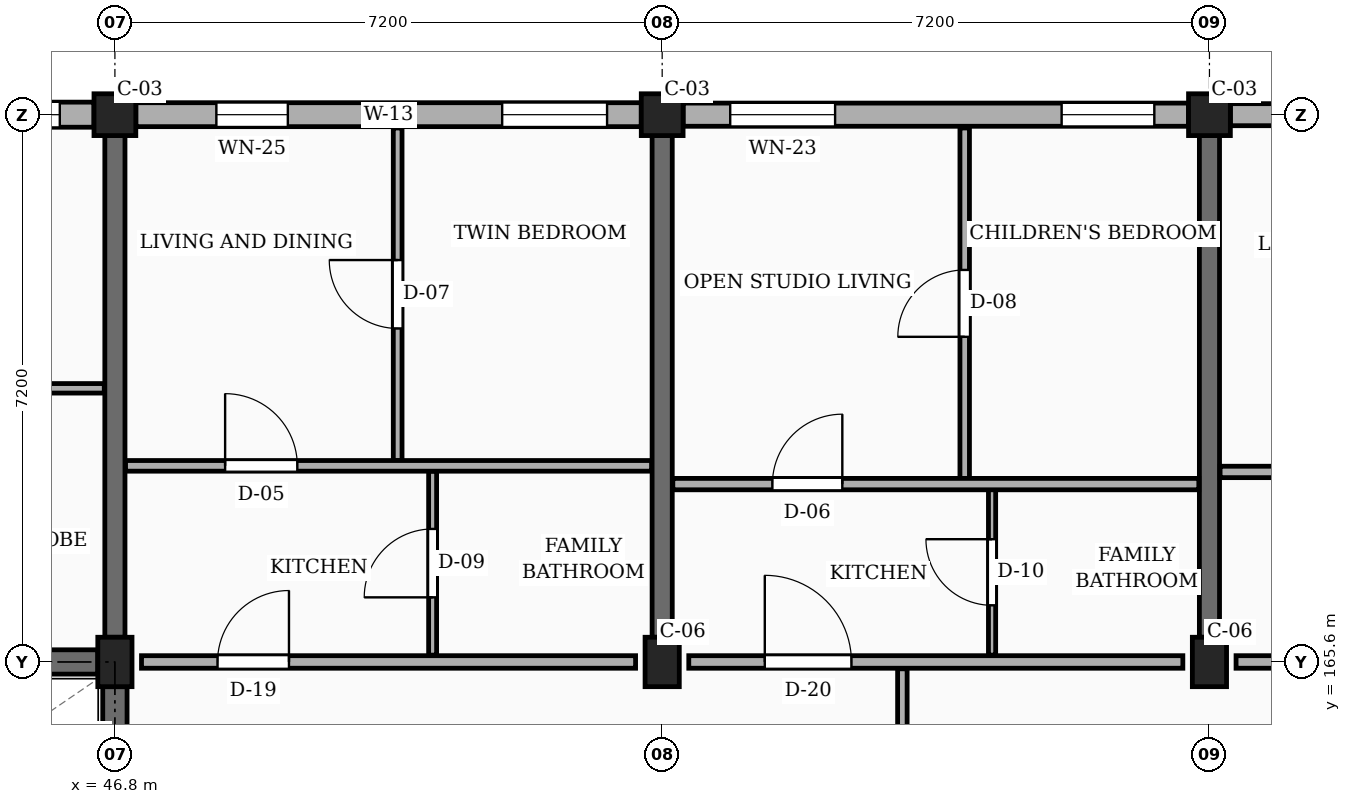
"""IFC4 building model, lengths in metres.
Left out: names, types, materials, properties, quantities, classifications, styles, units other than length and angle.
Written with IfcOpenShell. Run it as: python <this file> out.ifc"""

import sys

from ifc_helpers import new_model, si_unit, direction, frame, frame_2d, origin, origin_2d, place, context, subcontext, project, spatial, rectangle, extrude, element, fill, save


model = new_model("IFC4")
c1 = context("Model", 3, precision=1e-05, world=origin(), true_north=direction((0.0, 1.0)))
c2 = subcontext(c1, "Body", "Model", "MODEL_VIEW")
j1 = project(units=[si_unit("LENGTHUNIT", "METRE"), si_unit("PLANEANGLEUNIT", "RADIAN")], contexts=[c1])
p1 = place(None, origin())
s1 = spatial("IfcSite", under=j1, at=p1, CompositionType="ELEMENT")
p2 = place(p1, origin())
s2 = spatial("IfcBuilding", under=s1, at=p2, CompositionType="ELEMENT")
p3 = place(p2, frame((0.0, 0.0, 10.8)))
s3 = spatial("IfcBuildingStorey", under=s2, at=p3, CompositionType="ELEMENT", Elevation=10.8)
p4 = place(p3, frame((46.8, 165.6, 0.0), z_axis=(0.0, 0.0, 1.0), x_axis=(1.0, 0.0, 0.0)))
e1 = element("IfcColumn", 1, at=p4, inside=s3, PredefinedType="COLUMN", context=c2, shape_type="SweptSolid", body=[
    extrude(rectangle(XDim=0.45, YDim=0.65, at=origin_2d()), origin(), (0.0, 0.0, 1.0), 3.15),
])
p5 = place(p3, frame((46.8, 172.8, 0.0), z_axis=(0.0, 0.0, 1.0), x_axis=(1.0, 0.0, 0.0)))
e2 = element("IfcColumn", 2, at=p5, inside=s3, PredefinedType="COLUMN", context=c2, shape_type="SweptSolid", body=[
    extrude(rectangle(XDim=0.55, YDim=0.55, at=origin_2d()), origin(), (0.0, 0.0, 1.0), 3.15),
])
p6 = place(p3, frame((54.0, 165.6, 0.0), z_axis=(0.0, 0.0, 1.0), x_axis=(1.0, 0.0, 0.0)))
e3 = element("IfcColumn", 3, at=p6, inside=s3, PredefinedType="COLUMN", context=c2, shape_type="SweptSolid", body=[
    extrude(rectangle(XDim=0.45, YDim=0.65, at=origin_2d()), origin(), (0.0, 0.0, 1.0), 3.15),
])
p7 = place(p3, frame((54.0, 172.8, 0.0), z_axis=(0.0, 0.0, 1.0), x_axis=(1.0, 0.0, 0.0)))
e4 = element("IfcColumn", 4, at=p7, inside=s3, PredefinedType="COLUMN", context=c2, shape_type="SweptSolid", body=[
    extrude(rectangle(XDim=0.55, YDim=0.55, at=origin_2d()), origin(), (0.0, 0.0, 1.0), 3.15),
])
p8 = place(p3, frame((61.2, 165.6, 0.0), z_axis=(0.0, 0.0, 1.0), x_axis=(1.0, 0.0, 0.0)))
e5 = element("IfcColumn", 5, at=p8, inside=s3, PredefinedType="COLUMN", context=c2, shape_type="SweptSolid", body=[
    extrude(rectangle(XDim=0.45, YDim=0.65, at=origin_2d()), origin(), (0.0, 0.0, 1.0), 3.15),
])
p9 = place(p3, frame((61.2, 172.8, 0.0), z_axis=(0.0, 0.0, 1.0), x_axis=(1.0, 0.0, 0.0)))
e6 = element("IfcColumn", 6, at=p9, inside=s3, PredefinedType="COLUMN", context=c2, shape_type="SweptSolid", body=[
    extrude(rectangle(XDim=0.55, YDim=0.55, at=origin_2d()), origin(), (0.0, 0.0, 1.0), 3.15),
])
for number, where, z_axis, x_axis in (
    (7, (46.8, 165.925, 0.0), (0.0, 0.0, 1.0), (0.0, 1.0, 0.0)),
    (8, (54.0, 165.925, 0.0), (0.0, 0.0, 1.0), (0.0, 1.0, 0.0)),
    (9, (61.2, 165.925, 0.0), (0.0, 0.0, 1.0), (0.0, 1.0, 0.0)),
):
    element("IfcWall", number, at=place(p3, frame(where, z_axis=z_axis, x_axis=x_axis)), inside=s3, PredefinedType="SOLIDWALL", context=c2, shape_type="SweptSolid", body=[
        extrude(rectangle(XDim=6.6, YDim=0.265, at=frame_2d((3.3, 0.0))), origin(), (0.0, 0.0, 1.0), 2.185),
    ])
p10 = place(p3, frame((68.125, 172.8, 0.0), z_axis=(0.0, 0.0, 1.0), x_axis=(-1.0, 0.0, 0.0)))
e10 = element("IfcWall", 10, at=p10, inside=s3, PredefinedType="SOLIDWALL", context=c2, shape_type="SweptSolid", body=[
    extrude(rectangle(XDim=6.65, YDim=0.29, at=frame_2d((3.325, 0.0))), origin(), (0.0, 0.0, 1.0), 2.455),
])
p11 = place(p10, frame((0.45, 0.0, 0.78)))
e11 = element("IfcOpeningElement", 11, at=p11, cuts=e10, PredefinedType="OPENING", context=c2, shape_type="SweptSolid", body=[
    extrude(rectangle(XDim=1.06, YDim=1.36, at=frame_2d((0.53, 0.68))), frame((0.0, 0.155, 0.0), z_axis=(0.0, -1.0, 0.0), x_axis=(1.0, 0.0, 0.0)), (0.0, 0.0, 1.0), 0.31),
])
p12 = place(p10, frame((4.65, 0.0, 0.78)))
e12 = element("IfcOpeningElement", 12, at=p12, cuts=e10, PredefinedType="OPENING", context=c2, shape_type="SweptSolid", body=[
    extrude(rectangle(XDim=1.22, YDim=1.36, at=frame_2d((0.61, 0.68))), frame((0.0, 0.155, 0.0), z_axis=(0.0, -1.0, 0.0), x_axis=(1.0, 0.0, 0.0)), (0.0, 0.0, 1.0), 0.31),
])
p13 = place(p3, frame((60.925, 172.8, 0.0), z_axis=(0.0, 0.0, 1.0), x_axis=(-1.0, 0.0, 0.0)))
e13 = element("IfcWall", 13, at=p13, inside=s3, PredefinedType="SOLIDWALL", context=c2, shape_type="SweptSolid", body=[
    extrude(rectangle(XDim=6.65, YDim=0.305, at=frame_2d((3.325, 0.0))), origin(), (0.0, 0.0, 1.0), 2.455),
])
p14 = place(p13, frame((0.45, 0.0, 0.78)))
e14 = element("IfcOpeningElement", 14, at=p14, cuts=e13, PredefinedType="OPENING", context=c2, shape_type="SweptSolid", body=[
    extrude(rectangle(XDim=1.22, YDim=1.36, at=frame_2d((0.61, 0.68))), frame((0.0, 0.163, 0.0), z_axis=(0.0, -1.0, 0.0), x_axis=(1.0, 0.0, 0.0)), (0.0, 0.0, 1.0), 0.325),
])
p15 = place(p13, frame((4.65, 0.0, 0.78)))
e15 = element("IfcOpeningElement", 15, at=p15, cuts=e13, PredefinedType="OPENING", context=c2, shape_type="SweptSolid", body=[
    extrude(rectangle(XDim=1.38, YDim=1.36, at=frame_2d((0.69, 0.68))), frame((0.0, 0.163, 0.0), z_axis=(0.0, -1.0, 0.0), x_axis=(1.0, 0.0, 0.0)), (0.0, 0.0, 1.0), 0.325),
])
p16 = place(p3, frame((53.725, 172.8, 0.0), z_axis=(0.0, 0.0, 1.0), x_axis=(-1.0, 0.0, 0.0)))
e16 = element("IfcWall", 16, at=p16, inside=s3, PredefinedType="SOLIDWALL", context=c2, shape_type="SweptSolid", body=[
    extrude(rectangle(XDim=6.65, YDim=0.315, at=frame_2d((3.325, 0.0))), origin(), (0.0, 0.0, 1.0), 2.455),
])
p17 = place(p16, frame((0.45, 0.0, 0.78)))
e17 = element("IfcOpeningElement", 17, at=p17, cuts=e16, PredefinedType="OPENING", context=c2, shape_type="SweptSolid", body=[
    extrude(rectangle(XDim=1.38, YDim=1.36, at=frame_2d((0.69, 0.68))), frame((0.0, 0.167, 0.0), z_axis=(0.0, -1.0, 0.0), x_axis=(1.0, 0.0, 0.0)), (0.0, 0.0, 1.0), 0.335),
])
p18 = place(p16, frame((4.65, 0.0, 0.78)))
e18 = element("IfcOpeningElement", 18, at=p18, cuts=e16, PredefinedType="OPENING", context=c2, shape_type="SweptSolid", body=[
    extrude(rectangle(XDim=0.94, YDim=1.44, at=frame_2d((0.47, 0.72))), frame((0.0, 0.167, 0.0), z_axis=(0.0, -1.0, 0.0), x_axis=(1.0, 0.0, 0.0)), (0.0, 0.0, 1.0), 0.335),
])
p19 = place(p3, frame((46.525, 172.8, 0.0), z_axis=(0.0, 0.0, 1.0), x_axis=(-1.0, 0.0, 0.0)))
e19 = element("IfcWall", 19, at=p19, inside=s3, PredefinedType="SOLIDWALL", context=c2, shape_type="SweptSolid", body=[
    extrude(rectangle(XDim=6.65, YDim=0.33, at=frame_2d((3.325, 0.0))), origin(), (0.0, 0.0, 1.0), 2.455),
])
p20 = place(p19, frame((0.45, 0.0, 0.78)))
e20 = element("IfcOpeningElement", 20, at=p20, cuts=e19, PredefinedType="OPENING", context=c2, shape_type="SweptSolid", body=[
    extrude(rectangle(XDim=0.94, YDim=1.44, at=frame_2d((0.47, 0.72))), frame((0.0, 0.175, 0.0), z_axis=(0.0, -1.0, 0.0), x_axis=(1.0, 0.0, 0.0)), (0.0, 0.0, 1.0), 0.35),
])
p21 = place(p19, frame((4.65, 0.0, 0.78)))
e21 = element("IfcOpeningElement", 21, at=p21, cuts=e19, PredefinedType="OPENING", context=c2, shape_type="SweptSolid", body=[
    extrude(rectangle(XDim=1.15, YDim=1.44, at=frame_2d((0.575, 0.72))), frame((0.0, 0.175, 0.0), z_axis=(0.0, -1.0, 0.0), x_axis=(1.0, 0.0, 0.0)), (0.0, 0.0, 1.0), 0.35),
])
p22 = place(p3, frame((39.825, 165.6, 0.0), z_axis=(0.0, 0.0, 1.0), x_axis=(1.0, 0.0, 0.0)))
e22 = element("IfcWall", 22, at=p22, inside=s3, PredefinedType="SHEAR", context=c2, shape_type="SweptSolid", body=[
    extrude(rectangle(XDim=6.75, YDim=0.32, at=frame_2d((3.375, 0.0))), origin(), (0.0, 0.0, 1.0), 2.885),
])
p23 = place(p3, frame((46.8, 158.725, 0.0), z_axis=(0.0, 0.0, 1.0), x_axis=(0.0, 1.0, 0.0)))
e23 = element("IfcWall", 23, at=p23, inside=s3, PredefinedType="SHEAR", context=c2, shape_type="SweptSolid", body=[
    extrude(rectangle(XDim=6.55, YDim=0.32, at=frame_2d((3.275, 0.0))), origin(), (0.0, 0.0, 1.0), 2.885),
])
p24 = place(p3, frame((47.15, 165.6, 0.0), z_axis=(0.0, 0.0, 1.0), x_axis=(1.0, 0.0, 0.0)))
e24 = element("IfcWall", 24, at=p24, inside=s3, PredefinedType="PARTITIONING", context=c2, shape_type="SweptSolid", body=[
    extrude(rectangle(XDim=6.5, YDim=0.165, at=frame_2d((3.25, 0.0))), origin(), (0.0, 0.0, 1.0), 2.235),
])
p25 = place(p24, frame((1.0, 0.0, 0.0)))
e25 = element("IfcOpeningElement", 25, at=p25, cuts=e24, PredefinedType="OPENING", context=c2, shape_type="SweptSolid", body=[
    extrude(rectangle(XDim=0.94, YDim=2.12, at=frame_2d((0.47, 1.06))), frame((0.0, 0.093, 0.0), z_axis=(0.0, -1.0, 0.0), x_axis=(1.0, 0.0, 0.0)), (0.0, 0.0, 1.0), 0.185),
])
p26 = place(p3, frame((54.35, 165.6, 0.0), z_axis=(0.0, 0.0, 1.0), x_axis=(1.0, 0.0, 0.0)))
e26 = element("IfcWall", 26, at=p26, inside=s3, PredefinedType="PARTITIONING", context=c2, shape_type="SweptSolid", body=[
    extrude(rectangle(XDim=6.5, YDim=0.165, at=frame_2d((3.25, 0.0))), origin(), (0.0, 0.0, 1.0), 2.235),
])
p27 = place(p26, frame((1.0, 0.0, 0.0)))
e27 = element("IfcOpeningElement", 27, at=p27, cuts=e26, PredefinedType="OPENING", context=c2, shape_type="SweptSolid", body=[
    extrude(rectangle(XDim=1.14, YDim=2.18, at=frame_2d((0.57, 1.09))), frame((0.0, 0.093, 0.0), z_axis=(0.0, -1.0, 0.0), x_axis=(1.0, 0.0, 0.0)), (0.0, 0.0, 1.0), 0.185),
])
p28 = place(p3, frame((61.55, 165.6, 0.0), z_axis=(0.0, 0.0, 1.0), x_axis=(1.0, 0.0, 0.0)))
e28 = element("IfcWall", 28, at=p28, inside=s3, PredefinedType="PARTITIONING", context=c2, shape_type="SweptSolid", body=[
    extrude(rectangle(XDim=6.5, YDim=0.165, at=frame_2d((3.25, 0.0))), origin(), (0.0, 0.0, 1.0), 2.235),
])
p29 = place(p28, frame((1.0, 0.0, 0.0)))
e29 = element("IfcOpeningElement", 29, at=p29, cuts=e28, PredefinedType="OPENING", context=c2, shape_type="SweptSolid", body=[
    extrude(rectangle(XDim=1.0, YDim=2.15, at=frame_2d((0.5, 1.075))), frame((0.0, 0.093, 0.0), z_axis=(0.0, -1.0, 0.0), x_axis=(1.0, 0.0, 0.0)), (0.0, 0.0, 1.0), 0.185),
])
p30 = place(p3, frame((39.74, 169.2, 0.0), z_axis=(0.0, 0.0, 1.0), x_axis=(1.0, 0.0, 0.0)))
e30 = element("IfcWall", 30, at=p30, inside=s3, PredefinedType="PARTITIONING", context=c2, shape_type="SweptSolid", body=[
    extrude(rectangle(XDim=6.92, YDim=0.125, at=frame_2d((3.46, 0.0))), origin(), (0.0, 0.0, 1.0), 2.32),
])
p31 = place(p30, frame((1.05, 0.0, 0.0)))
e31 = element("IfcOpeningElement", 31, at=p31, cuts=e30, PredefinedType="OPENING", context=c2, shape_type="SweptSolid", body=[
    extrude(rectangle(XDim=0.87, YDim=2.05, at=frame_2d((0.435, 1.025))), frame((0.0, 0.073, 0.0), z_axis=(0.0, -1.0, 0.0), x_axis=(1.0, 0.0, 0.0)), (0.0, 0.0, 1.0), 0.145),
])
p32 = place(p30, frame((4.45, 0.0, 0.0)))
e32 = element("IfcOpeningElement", 32, at=p32, cuts=e30, PredefinedType="OPENING", context=c2, shape_type="SweptSolid", body=[
    extrude(rectangle(XDim=0.88, YDim=2.08, at=frame_2d((0.44, 1.04))), frame((0.0, 0.073, 0.0), z_axis=(0.0, -1.0, 0.0), x_axis=(1.0, 0.0, 0.0)), (0.0, 0.0, 1.0), 0.145),
])
p33 = place(p3, frame((50.52, 168.25, 0.0), z_axis=(0.0, 0.0, 1.0), x_axis=(0.0, 1.0, 0.0)))
e33 = element("IfcWall", 33, at=p33, inside=s3, PredefinedType="PARTITIONING", context=c2, shape_type="SweptSolid", body=[
    extrude(rectangle(XDim=4.375, YDim=0.115, at=frame_2d((2.188, 0.0))), origin(), (0.0, 0.0, 1.0), 2.32),
])
p34 = place(p33, frame((1.738, 0.0, 0.0)))
e34 = element("IfcOpeningElement", 34, at=p34, cuts=e33, PredefinedType="OPENING", context=c2, shape_type="SweptSolid", body=[
    extrude(rectangle(XDim=0.9, YDim=2.1, at=frame_2d((0.45, 1.05))), frame((0.0, 0.067, 0.0), z_axis=(0.0, -1.0, 0.0), x_axis=(1.0, 0.0, 0.0)), (0.0, 0.0, 1.0), 0.135),
])
p35 = place(p3, frame((50.98, 165.69, 0.0), z_axis=(0.0, 0.0, 1.0), x_axis=(0.0, 1.0, 0.0)))
e35 = element("IfcWall", 35, at=p35, inside=s3, PredefinedType="PARTITIONING", context=c2, shape_type="SweptSolid", body=[
    extrude(rectangle(XDim=2.42, YDim=0.105, at=frame_2d((1.21, 0.0))), origin(), (0.0, 0.0, 1.0), 2.32),
])
p36 = place(p35, frame((0.76, 0.0, 0.0)))
e36 = element("IfcOpeningElement", 36, at=p36, cuts=e35, PredefinedType="OPENING", context=c2, shape_type="SweptSolid", body=[
    extrude(rectangle(XDim=0.9, YDim=2.05, at=frame_2d((0.45, 1.025))), frame((0.0, 0.062, 0.0), z_axis=(0.0, -1.0, 0.0), x_axis=(1.0, 0.0, 0.0)), (0.0, 0.0, 1.0), 0.125),
])
p37 = place(p3, frame((46.94, 168.18, 0.0), z_axis=(0.0, 0.0, 1.0), x_axis=(1.0, 0.0, 0.0)))
e37 = element("IfcWall", 37, at=p37, inside=s3, PredefinedType="PARTITIONING", context=c2, shape_type="SweptSolid", body=[
    extrude(rectangle(XDim=6.92, YDim=0.14, at=frame_2d((3.46, 0.0))), origin(), (0.0, 0.0, 1.0), 2.32),
])
p38 = place(p37, frame((1.31, 0.0, 0.0)))
e38 = element("IfcOpeningElement", 38, at=p38, cuts=e37, PredefinedType="OPENING", context=c2, shape_type="SweptSolid", body=[
    extrude(rectangle(XDim=0.95, YDim=2.1, at=frame_2d((0.475, 1.05))), frame((0.0, 0.08, 0.0), z_axis=(0.0, -1.0, 0.0), x_axis=(1.0, 0.0, 0.0)), (0.0, 0.0, 1.0), 0.16),
])
p39 = place(p3, frame((57.16, 158.49, 0.0), z_axis=(0.0, 0.0, 1.0), x_axis=(0.0, 1.0, 0.0)))
e39 = element("IfcWall", 39, at=p39, inside=s3, PredefinedType="PARTITIONING", context=c2, shape_type="SweptSolid", body=[
    extrude(rectangle(XDim=7.02, YDim=0.125, at=frame_2d((3.51, 0.0))), origin(), (0.0, 0.0, 1.0), 2.32),
])
p40 = place(p39, frame((2.85, 0.0, 0.0)))
e40 = element("IfcOpeningElement", 40, at=p40, cuts=e39, PredefinedType="OPENING", context=c2, shape_type="SweptSolid", body=[
    extrude(rectangle(XDim=1.02, YDim=2.15, at=frame_2d((0.51, 1.075))), frame((0.0, 0.073, 0.0), z_axis=(0.0, -1.0, 0.0), x_axis=(1.0, 0.0, 0.0)), (0.0, 0.0, 1.0), 0.145),
])
p41 = place(p3, frame((57.98, 168.01, 0.0), z_axis=(0.0, 0.0, 1.0), x_axis=(0.0, 1.0, 0.0)))
e41 = element("IfcWall", 41, at=p41, inside=s3, PredefinedType="PARTITIONING", context=c2, shape_type="SweptSolid", body=[
    extrude(rectangle(XDim=4.615, YDim=0.125, at=frame_2d((2.308, 0.0))), origin(), (0.0, 0.0, 1.0), 2.32),
])
p42 = place(p41, frame((1.867, 0.0, 0.0)))
e42 = element("IfcOpeningElement", 42, at=p42, cuts=e41, PredefinedType="OPENING", context=c2, shape_type="SweptSolid", body=[
    extrude(rectangle(XDim=0.88, YDim=2.08, at=frame_2d((0.44, 1.04))), frame((0.0, 0.073, 0.0), z_axis=(0.0, -1.0, 0.0), x_axis=(1.0, 0.0, 0.0)), (0.0, 0.0, 1.0), 0.145),
])
p43 = place(p3, frame((58.34, 165.69, 0.0), z_axis=(0.0, 0.0, 1.0), x_axis=(0.0, 1.0, 0.0)))
e43 = element("IfcWall", 43, at=p43, inside=s3, PredefinedType="PARTITIONING", context=c2, shape_type="SweptSolid", body=[
    extrude(rectangle(XDim=2.18, YDim=0.095, at=frame_2d((1.09, 0.0))), origin(), (0.0, 0.0, 1.0), 2.32),
])
p44 = place(p43, frame((0.655, 0.0, 0.0)))
e44 = element("IfcOpeningElement", 44, at=p44, cuts=e43, PredefinedType="OPENING", context=c2, shape_type="SweptSolid", body=[
    extrude(rectangle(XDim=0.87, YDim=2.05, at=frame_2d((0.435, 1.025))), frame((0.0, 0.058, 0.0), z_axis=(0.0, -1.0, 0.0), x_axis=(1.0, 0.0, 0.0)), (0.0, 0.0, 1.0), 0.115),
])
p45 = place(p3, frame((54.14, 167.94, 0.0), z_axis=(0.0, 0.0, 1.0), x_axis=(1.0, 0.0, 0.0)))
e45 = element("IfcWall", 45, at=p45, inside=s3, PredefinedType="PARTITIONING", context=c2, shape_type="SweptSolid", body=[
    extrude(rectangle(XDim=6.92, YDim=0.15, at=frame_2d((3.46, 0.0))), origin(), (0.0, 0.0, 1.0), 2.32),
])
p46 = place(p45, frame((1.31, 0.0, 0.0)))
e46 = element("IfcOpeningElement", 46, at=p46, cuts=e45, PredefinedType="OPENING", context=c2, shape_type="SweptSolid", body=[
    extrude(rectangle(XDim=0.92, YDim=2.1, at=frame_2d((0.46, 1.05))), frame((0.0, 0.085, 0.0), z_axis=(0.0, -1.0, 0.0), x_axis=(1.0, 0.0, 0.0)), (0.0, 0.0, 1.0), 0.17),
])
p47 = place(p3, frame((61.34, 168.1, 0.0), z_axis=(0.0, 0.0, 1.0), x_axis=(1.0, 0.0, 0.0)))
e47 = element("IfcWall", 47, at=p47, inside=s3, PredefinedType="PARTITIONING", context=c2, shape_type="SweptSolid", body=[
    extrude(rectangle(XDim=6.92, YDim=0.15, at=frame_2d((3.46, 0.0))), origin(), (0.0, 0.0, 1.0), 2.32),
])
p48 = place(p47, frame((1.31, 0.0, 0.0)))
e48 = element("IfcOpeningElement", 48, at=p48, cuts=e47, PredefinedType="OPENING", context=c2, shape_type="SweptSolid", body=[
    extrude(rectangle(XDim=0.95, YDim=2.1, at=frame_2d((0.475, 1.05))), frame((0.0, 0.085, 0.0), z_axis=(0.0, -1.0, 0.0), x_axis=(1.0, 0.0, 0.0)), (0.0, 0.0, 1.0), 0.17),
])
p49 = place(p14, origin())
e49 = element("IfcWindow", 49, at=p49, inside=s3, PartitioningType="SINGLE_PANEL", PredefinedType="WINDOW", context=c2, shape_type="SweptSolid", body=[
    extrude(rectangle(XDim=1.22, YDim=1.36, at=frame_2d((0.61, 0.68))), frame((0.0, 0.03, 0.0), z_axis=(0.0, -1.0, 0.0), x_axis=(1.0, 0.0, 0.0)), (0.0, 0.0, 1.0), 0.06),
])
fill(e14, e49)
p50 = place(p15, origin())
e50 = element("IfcWindow", 50, at=p50, inside=s3, PartitioningType="SINGLE_PANEL", PredefinedType="WINDOW", context=c2, shape_type="SweptSolid", body=[
    extrude(rectangle(XDim=1.38, YDim=1.36, at=frame_2d((0.69, 0.68))), frame((0.0, 0.03, 0.0), z_axis=(0.0, -1.0, 0.0), x_axis=(1.0, 0.0, 0.0)), (0.0, 0.0, 1.0), 0.06),
])
fill(e15, e50)
p51 = place(p17, origin())
e51 = element("IfcWindow", 51, at=p51, inside=s3, PartitioningType="SINGLE_PANEL", PredefinedType="WINDOW", context=c2, shape_type="SweptSolid", body=[
    extrude(rectangle(XDim=1.38, YDim=1.36, at=frame_2d((0.69, 0.68))), frame((0.0, 0.03, 0.0), z_axis=(0.0, -1.0, 0.0), x_axis=(1.0, 0.0, 0.0)), (0.0, 0.0, 1.0), 0.06),
])
fill(e17, e51)
p52 = place(p18, origin())
e52 = element("IfcWindow", 52, at=p52, inside=s3, PartitioningType="SINGLE_PANEL", PredefinedType="WINDOW", context=c2, shape_type="SweptSolid", body=[
    extrude(rectangle(XDim=0.94, YDim=1.44, at=frame_2d((0.47, 0.72))), frame((0.0, 0.03, 0.0), z_axis=(0.0, -1.0, 0.0), x_axis=(1.0, 0.0, 0.0)), (0.0, 0.0, 1.0), 0.06),
])
fill(e18, e52)
p53 = place(p20, origin())
e53 = element("IfcWindow", 53, at=p53, inside=s3, PartitioningType="SINGLE_PANEL", PredefinedType="WINDOW", context=c2, shape_type="SweptSolid", body=[
    extrude(rectangle(XDim=0.94, YDim=1.44, at=frame_2d((0.47, 0.72))), frame((0.0, 0.03, 0.0), z_axis=(0.0, -1.0, 0.0), x_axis=(1.0, 0.0, 0.0)), (0.0, 0.0, 1.0), 0.06),
])
fill(e20, e53)
p54 = place(p25, origin())
e54 = element("IfcDoor", 54, at=p54, inside=s3, OperationType="SINGLE_SWING_RIGHT", PredefinedType="DOOR", context=c2, shape_type="SweptSolid", body=[
    extrude(rectangle(XDim=0.94, YDim=2.12, at=frame_2d((0.47, 1.06))), frame((0.0, 0.025, 0.0), z_axis=(0.0, -1.0, 0.0), x_axis=(1.0, 0.0, 0.0)), (0.0, 0.0, 1.0), 0.05),
])
fill(e25, e54)
p55 = place(p27, origin())
e55 = element("IfcDoor", 55, at=p55, inside=s3, OperationType="SINGLE_SWING_LEFT", PredefinedType="DOOR", context=c2, shape_type="SweptSolid", body=[
    extrude(rectangle(XDim=1.14, YDim=2.18, at=frame_2d((0.57, 1.09))), frame((0.0, 0.025, 0.0), z_axis=(0.0, -1.0, 0.0), x_axis=(1.0, 0.0, 0.0)), (0.0, 0.0, 1.0), 0.05),
])
fill(e27, e55)
p56 = place(p34, origin())
e56 = element("IfcDoor", 56, at=p56, inside=s3, OperationType="SINGLE_SWING_RIGHT", PredefinedType="DOOR", context=c2, shape_type="SweptSolid", body=[
    extrude(rectangle(XDim=0.9, YDim=2.1, at=frame_2d((0.45, 1.05))), frame((0.0, 0.025, 0.0), z_axis=(0.0, -1.0, 0.0), x_axis=(1.0, 0.0, 0.0)), (0.0, 0.0, 1.0), 0.05),
])
fill(e34, e56)
p57 = place(p36, origin())
e57 = element("IfcDoor", 57, at=p57, inside=s3, OperationType="SINGLE_SWING_LEFT", PredefinedType="DOOR", context=c2, shape_type="SweptSolid", body=[
    extrude(rectangle(XDim=0.9, YDim=2.05, at=frame_2d((0.45, 1.025))), frame((0.0, 0.025, 0.0), z_axis=(0.0, -1.0, 0.0), x_axis=(1.0, 0.0, 0.0)), (0.0, 0.0, 1.0), 0.05),
])
fill(e36, e57)
p58 = place(p38, origin())
e58 = element("IfcDoor", 58, at=p58, inside=s3, OperationType="SINGLE_SWING_LEFT", PredefinedType="DOOR", context=c2, shape_type="SweptSolid", body=[
    extrude(rectangle(XDim=0.95, YDim=2.1, at=frame_2d((0.475, 1.05))), frame((0.0, 0.025, 0.0), z_axis=(0.0, -1.0, 0.0), x_axis=(1.0, 0.0, 0.0)), (0.0, 0.0, 1.0), 0.05),
])
fill(e38, e58)
p59 = place(p42, origin())
e59 = element("IfcDoor", 59, at=p59, inside=s3, OperationType="SINGLE_SWING_LEFT", PredefinedType="DOOR", context=c2, shape_type="SweptSolid", body=[
    extrude(rectangle(XDim=0.88, YDim=2.08, at=frame_2d((0.44, 1.04))), frame((0.0, 0.025, 0.0), z_axis=(0.0, -1.0, 0.0), x_axis=(1.0, 0.0, 0.0)), (0.0, 0.0, 1.0), 0.05),
])
fill(e42, e59)
p60 = place(p44, origin())
e60 = element("IfcDoor", 60, at=p60, inside=s3, OperationType="SINGLE_SWING_RIGHT", PredefinedType="DOOR", context=c2, shape_type="SweptSolid", body=[
    extrude(rectangle(XDim=0.87, YDim=2.05, at=frame_2d((0.435, 1.025))), frame((0.0, 0.025, 0.0), z_axis=(0.0, -1.0, 0.0), x_axis=(1.0, 0.0, 0.0)), (0.0, 0.0, 1.0), 0.05),
])
fill(e44, e60)
p61 = place(p46, origin())
e61 = element("IfcDoor", 61, at=p61, inside=s3, OperationType="SINGLE_SWING_RIGHT", PredefinedType="DOOR", context=c2, shape_type="SweptSolid", body=[
    extrude(rectangle(XDim=0.92, YDim=2.1, at=frame_2d((0.46, 1.05))), frame((0.0, 0.025, 0.0), z_axis=(0.0, -1.0, 0.0), x_axis=(1.0, 0.0, 0.0)), (0.0, 0.0, 1.0), 0.05),
])
fill(e46, e61)
save(model, sys.argv[1])
